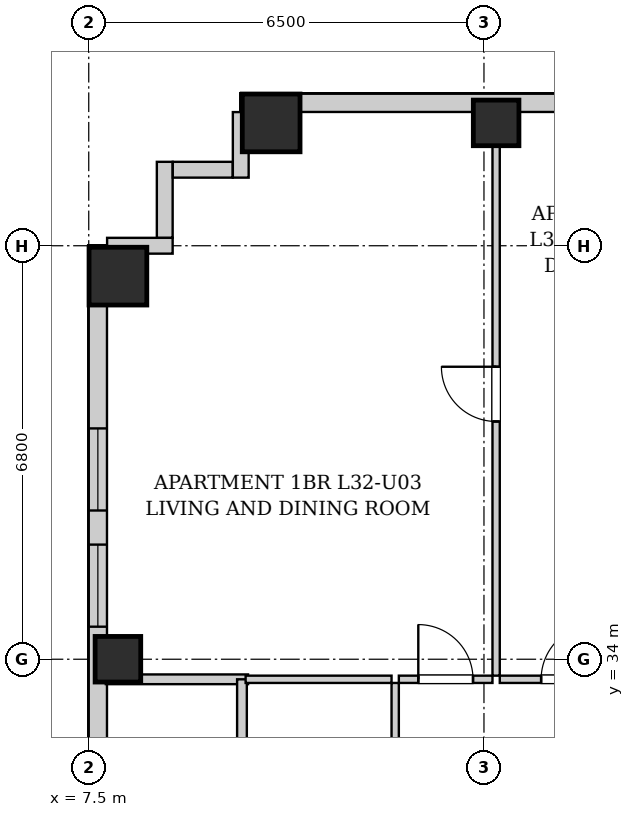
"""IFC4 building model, lengths in metres.
Left out: names, types, materials, properties, quantities, classifications, styles, units other than length and angle.
Written with IfcOpenShell. Run it as: python <this file> out.ifc"""

import sys

from ifc_helpers import new_model, si_unit, direction, frame, frame_2d, origin, origin_2d, place, context, subcontext, project, spatial, rectangle, extrude, element, fill, save


model = new_model("IFC4")
c1 = context("Model", 3, precision=1e-05, world=origin(), true_north=direction((0.0, 1.0)))
c2 = subcontext(c1, "Body", "Model", "MODEL_VIEW")
j1 = project(units=[si_unit("LENGTHUNIT", "METRE"), si_unit("PLANEANGLEUNIT", "RADIAN")], contexts=[c1])
p1 = place(None, origin())
s1 = spatial("IfcSite", under=j1, at=p1, CompositionType="ELEMENT")
p2 = place(p1, origin())
s2 = spatial("IfcBuilding", under=s1, at=p2, CompositionType="ELEMENT")
p3 = place(p2, frame((0.0, 0.0, 113.5)))
s3 = spatial("IfcBuildingStorey", under=s2, at=p3, CompositionType="ELEMENT", Elevation=113.5)
p4 = place(p3, frame((10.5, 42.82, 0.0), z_axis=(0.0, 0.0, 1.0), x_axis=(1.0, 0.0, 0.0)))
e1 = element("IfcColumn", 1, at=p4, inside=s3, PredefinedType="COLUMN", context=c2, shape_type="SweptSolid", body=[
    extrude(rectangle(XDim=0.95, YDim=0.95, at=origin_2d()), origin(), (0.0, 0.0, 1.0), 3.2),
])
for number, where, z_axis, x_axis in (
    (2, (14.2, 42.82, 0.0), (0.0, 0.0, 1.0), (1.0, 0.0, 0.0)),
    (3, (7.98, 34.0, 0.0), (0.0, 0.0, 1.0), (1.0, 0.0, 0.0)),
):
    element("IfcColumn", number, at=place(p3, frame(where, z_axis=z_axis, x_axis=x_axis)), inside=s3, PredefinedType="COLUMN", context=c2, shape_type="SweptSolid", body=[
        extrude(rectangle(XDim=0.75, YDim=0.75, at=origin_2d()), origin(), (0.0, 0.0, 1.0), 3.2),
    ])
p5 = place(p3, frame((7.98, 40.3, 0.0), z_axis=(0.0, 0.0, 1.0), x_axis=(1.0, 0.0, 0.0)))
e4 = element("IfcColumn", 4, at=p5, inside=s3, PredefinedType="COLUMN", context=c2, shape_type="SweptSolid", body=[
    extrude(rectangle(XDim=0.95, YDim=0.95, at=origin_2d()), origin(), (0.0, 0.0, 1.0), 3.2),
])
p6 = place(p3, frame((10.0, 43.15, 0.0), z_axis=(0.0, 0.0, 1.0), x_axis=(1.0, 0.0, 0.0)))
e5 = element("IfcWall", 5, at=p6, inside=s3, PredefinedType="SOLIDWALL", context=c2, shape_type="SweptSolid", body=[
    extrude(rectangle(XDim=21.95, YDim=0.3, at=frame_2d((10.975, 0.0))), origin(), (0.0, 0.0, 1.0), 2.94),
])
p7 = place(p6, frame((5.489, 0.0, 0.55)))
e6 = element("IfcOpeningElement", 6, at=p7, cuts=e5, PredefinedType="OPENING", context=c2, shape_type="SweptSolid", body=[
    extrude(rectangle(XDim=1.35, YDim=1.2, at=frame_2d((0.675, 0.6))), frame((0.0, 0.16, 0.0), z_axis=(0.0, -1.0, 0.0), x_axis=(1.0, 0.0, 0.0)), (0.0, 0.0, 1.0), 0.32),
])
p8 = place(p6, frame((9.322, 0.0, 0.55)))
e7 = element("IfcOpeningElement", 7, at=p8, cuts=e5, PredefinedType="OPENING", context=c2, shape_type="SweptSolid", body=[
    extrude(rectangle(XDim=1.35, YDim=1.2, at=frame_2d((0.675, 0.6))), frame((0.0, 0.16, 0.0), z_axis=(0.0, -1.0, 0.0), x_axis=(1.0, 0.0, 0.0)), (0.0, 0.0, 1.0), 0.32),
])
p9 = place(p6, frame((18.869, 0.0, 0.55)))
e8 = element("IfcOpeningElement", 8, at=p9, cuts=e5, PredefinedType="OPENING", context=c2, shape_type="SweptSolid", body=[
    extrude(rectangle(XDim=1.35, YDim=1.2, at=frame_2d((0.675, 0.6))), frame((0.0, 0.16, 0.0), z_axis=(0.0, -1.0, 0.0), x_axis=(1.0, 0.0, 0.0)), (0.0, 0.0, 1.0), 0.32),
])
p10 = place(p3, frame((7.65, 2.5, 0.0), z_axis=(0.0, 0.0, 1.0), x_axis=(0.0, 1.0, 0.0)))
e9 = element("IfcWall", 9, at=p10, inside=s3, PredefinedType="SOLIDWALL", context=c2, shape_type="SweptSolid", body=[
    extrude(rectangle(XDim=38.3, YDim=0.3, at=frame_2d((19.15, 0.0))), origin(), (0.0, 0.0, 1.0), 2.94),
])
p11 = place(p10, frame((3.38, 0.0, 0.55)))
e10 = element("IfcOpeningElement", 10, at=p11, cuts=e9, PredefinedType="OPENING", context=c2, shape_type="SweptSolid", body=[
    extrude(rectangle(XDim=1.35, YDim=1.2, at=frame_2d((0.675, 0.6))), frame((0.0, 0.16, 0.0), z_axis=(0.0, -1.0, 0.0), x_axis=(1.0, 0.0, 0.0)), (0.0, 0.0, 1.0), 0.32),
])
p12 = place(p10, frame((1.135, 0.0, 0.55)))
e11 = element("IfcOpeningElement", 11, at=p12, cuts=e9, PredefinedType="OPENING", context=c2, shape_type="SweptSolid", body=[
    extrude(rectangle(XDim=1.35, YDim=1.2, at=frame_2d((0.675, 0.6))), frame((0.0, 0.16, 0.0), z_axis=(0.0, -1.0, 0.0), x_axis=(1.0, 0.0, 0.0)), (0.0, 0.0, 1.0), 0.32),
])
p13 = place(p10, frame((33.946, 0.0, 0.55)))
e12 = element("IfcOpeningElement", 12, at=p13, cuts=e9, PredefinedType="OPENING", context=c2, shape_type="SweptSolid", body=[
    extrude(rectangle(XDim=1.35, YDim=1.2, at=frame_2d((0.675, 0.6))), frame((0.0, 0.16, 0.0), z_axis=(0.0, -1.0, 0.0), x_axis=(1.0, 0.0, 0.0)), (0.0, 0.0, 1.0), 0.32),
])
p14 = place(p10, frame((32.035, 0.0, 0.55)))
e13 = element("IfcOpeningElement", 13, at=p14, cuts=e9, PredefinedType="OPENING", context=c2, shape_type="SweptSolid", body=[
    extrude(rectangle(XDim=1.35, YDim=1.2, at=frame_2d((0.675, 0.6))), frame((0.0, 0.16, 0.0), z_axis=(0.0, -1.0, 0.0), x_axis=(1.0, 0.0, 0.0)), (0.0, 0.0, 1.0), 0.32),
])
p15 = place(p10, frame((15.65, 0.0, 0.55)))
e14 = element("IfcOpeningElement", 14, at=p15, cuts=e9, PredefinedType="OPENING", context=c2, shape_type="SweptSolid", body=[
    extrude(rectangle(XDim=1.35, YDim=1.2, at=frame_2d((0.675, 0.6))), frame((0.0, 0.16, 0.0), z_axis=(0.0, -1.0, 0.0), x_axis=(1.0, 0.0, 0.0)), (0.0, 0.0, 1.0), 0.32),
])
p16 = place(p10, frame((13.035, 0.0, 0.55)))
e15 = element("IfcOpeningElement", 15, at=p16, cuts=e9, PredefinedType="OPENING", context=c2, shape_type="SweptSolid", body=[
    extrude(rectangle(XDim=1.35, YDim=1.2, at=frame_2d((0.675, 0.6))), frame((0.0, 0.16, 0.0), z_axis=(0.0, -1.0, 0.0), x_axis=(1.0, 0.0, 0.0)), (0.0, 0.0, 1.0), 0.32),
])
p17 = place(p10, frame((22.831, 0.0, 0.55)))
e16 = element("IfcOpeningElement", 16, at=p17, cuts=e9, PredefinedType="OPENING", context=c2, shape_type="SweptSolid", body=[
    extrude(rectangle(XDim=1.35, YDim=1.2, at=frame_2d((0.675, 0.6))), frame((0.0, 0.16, 0.0), z_axis=(0.0, -1.0, 0.0), x_axis=(1.0, 0.0, 0.0)), (0.0, 0.0, 1.0), 0.32),
])
p18 = place(p10, frame((24.441, 0.0, 0.55)))
e17 = element("IfcOpeningElement", 17, at=p18, cuts=e9, PredefinedType="OPENING", context=c2, shape_type="SweptSolid", body=[
    extrude(rectangle(XDim=1.35, YDim=1.2, at=frame_2d((0.675, 0.6))), frame((0.0, 0.16, 0.0), z_axis=(0.0, -1.0, 0.0), x_axis=(1.0, 0.0, 0.0)), (0.0, 0.0, 1.0), 0.32),
])
p19 = place(p3, frame((7.802, 40.8, 0.0), z_axis=(0.0, 0.0, 1.0), x_axis=(1.0, 0.0, 0.0)))
e18 = element("IfcWall", 18, at=p19, inside=s3, PredefinedType="SOLIDWALL", context=c2, shape_type="SweptSolid", body=[
    extrude(rectangle(XDim=1.078, YDim=0.26, at=frame_2d((0.539, 0.0))), origin(), (0.0, 0.0, 1.0), 2.94),
])
p20 = place(p3, frame((8.75, 40.932, 0.0), z_axis=(0.0, 0.0, 1.0), x_axis=(0.0, 1.0, 0.0)))
e19 = element("IfcWall", 19, at=p20, inside=s3, PredefinedType="SOLIDWALL", context=c2, shape_type="SweptSolid", body=[
    extrude(rectangle(XDim=1.248, YDim=0.26, at=frame_2d((0.624, 0.0))), origin(), (0.0, 0.0, 1.0), 2.94),
])
p21 = place(p3, frame((8.882, 42.05, 0.0), z_axis=(0.0, 0.0, 1.0), x_axis=(1.0, 0.0, 0.0)))
e20 = element("IfcWall", 20, at=p21, inside=s3, PredefinedType="SOLIDWALL", context=c2, shape_type="SweptSolid", body=[
    extrude(rectangle(XDim=0.986, YDim=0.26, at=frame_2d((0.493, 0.0))), origin(), (0.0, 0.0, 1.0), 2.94),
])
p22 = place(p3, frame((10.0, 41.92, 0.0), z_axis=(0.0, 0.0, 1.0), x_axis=(0.0, 1.0, 0.0)))
e21 = element("IfcWall", 21, at=p22, inside=s3, PredefinedType="SOLIDWALL", context=c2, shape_type="SweptSolid", body=[
    extrude(rectangle(XDim=1.078, YDim=0.26, at=frame_2d((0.539, 0.0))), origin(), (0.0, 0.0, 1.0), 2.94),
])
p23 = place(p3, frame((7.78, 33.67, 0.0), z_axis=(0.0, 0.0, 1.0), x_axis=(1.0, 0.0, 0.0)))
e22 = element("IfcWall", 22, at=p23, inside=s3, PredefinedType="PARTITIONING", context=c2, shape_type="SweptSolid", body=[
    extrude(rectangle(XDim=2.34, YDim=0.16, at=frame_2d((1.17, 0.0))), origin(), (0.0, 0.0, 1.0), 2.94),
])
p24 = place(p3, frame((10.02, 30.76, 0.0), z_axis=(0.0, 0.0, 1.0), x_axis=(0.0, 1.0, 0.0)))
e23 = element("IfcWall", 23, at=p24, inside=s3, PredefinedType="PARTITIONING", context=c2, shape_type="SweptSolid", body=[
    extrude(rectangle(XDim=2.91, YDim=0.16, at=frame_2d((1.455, 0.0))), origin(), (0.0, 0.0, 1.0), 2.94),
])
p25 = place(p3, frame((12.54, 30.76, 0.0), z_axis=(0.0, 0.0, 1.0), x_axis=(0.0, 1.0, 0.0)))
e24 = element("IfcWall", 24, at=p25, inside=s3, PredefinedType="PARTITIONING", context=c2, shape_type="SweptSolid", body=[
    extrude(rectangle(XDim=2.85, YDim=0.12, at=frame_2d((1.425, 0.0))), origin(), (0.0, 0.0, 1.0), 2.94),
])
p26 = place(p25, frame((0.995, 0.0, 0.0)))
e25 = element("IfcOpeningElement", 25, at=p26, cuts=e24, PredefinedType="OPENING", context=c2, shape_type="SweptSolid", body=[
    extrude(rectangle(XDim=0.86, YDim=2.05, at=frame_2d((0.43, 1.025))), frame((0.0, 0.07, 0.0), z_axis=(0.0, -1.0, 0.0), x_axis=(1.0, 0.0, 0.0)), (0.0, 0.0, 1.0), 0.14),
])
p27 = place(p3, frame((10.08, 33.67, 0.0), z_axis=(0.0, 0.0, 1.0), x_axis=(1.0, 0.0, 0.0)))
e26 = element("IfcWall", 26, at=p27, inside=s3, PredefinedType="PARTITIONING", context=c2, shape_type="SweptSolid", body=[
    extrude(rectangle(XDim=2.4, YDim=0.12, at=frame_2d((1.2, 0.0))), origin(), (0.0, 0.0, 1.0), 2.94),
])
p28 = place(p3, frame((12.6, 33.67, 0.0), z_axis=(0.0, 0.0, 1.0), x_axis=(1.0, 0.0, 0.0)))
e27 = element("IfcWall", 27, at=p28, inside=s3, PredefinedType="PARTITIONING", context=c2, shape_type="SweptSolid", body=[
    extrude(rectangle(XDim=1.54, YDim=0.12, at=frame_2d((0.77, 0.0))), origin(), (0.0, 0.0, 1.0), 2.94),
])
p29 = place(p28, frame((0.32, 0.0, 0.0)))
e28 = element("IfcOpeningElement", 28, at=p29, cuts=e27, PredefinedType="OPENING", context=c2, shape_type="SweptSolid", body=[
    extrude(rectangle(XDim=0.9, YDim=2.05, at=frame_2d((0.45, 1.025))), frame((0.0, 0.07, 0.0), z_axis=(0.0, -1.0, 0.0), x_axis=(1.0, 0.0, 0.0)), (0.0, 0.0, 1.0), 0.14),
])
p30 = place(p3, frame((14.26, 33.67, 0.0), z_axis=(0.0, 0.0, 1.0), x_axis=(1.0, 0.0, 0.0)))
e29 = element("IfcWall", 29, at=p30, inside=s3, PredefinedType="PARTITIONING", context=c2, shape_type="SweptSolid", body=[
    extrude(rectangle(XDim=2.26, YDim=0.12, at=frame_2d((1.13, 0.0))), origin(), (0.0, 0.0, 1.0), 2.94),
])
p31 = place(p30, frame((0.68, 0.0, 0.0)))
e30 = element("IfcOpeningElement", 30, at=p31, cuts=e29, PredefinedType="OPENING", context=c2, shape_type="SweptSolid", body=[
    extrude(rectangle(XDim=0.9, YDim=2.05, at=frame_2d((0.45, 1.025))), frame((0.0, 0.07, 0.0), z_axis=(0.0, -1.0, 0.0), x_axis=(1.0, 0.0, 0.0)), (0.0, 0.0, 1.0), 0.14),
])
p32 = place(p3, frame((14.2, 33.73, 0.0), z_axis=(0.0, 0.0, 1.0), x_axis=(0.0, 1.0, 0.0)))
e31 = element("IfcWall", 31, at=p32, inside=s3, PredefinedType="PARTITIONING", context=c2, shape_type="SweptSolid", body=[
    extrude(rectangle(XDim=9.29, YDim=0.12, at=frame_2d((4.645, 0.0))), origin(), (0.0, 0.0, 1.0), 2.94),
])
p33 = place(p32, frame((4.18, 0.0, 0.0)))
e32 = element("IfcOpeningElement", 32, at=p33, cuts=e31, PredefinedType="OPENING", context=c2, shape_type="SweptSolid", body=[
    extrude(rectangle(XDim=0.9, YDim=2.05, at=frame_2d((0.45, 1.025))), frame((0.0, 0.07, 0.0), z_axis=(0.0, -1.0, 0.0), x_axis=(1.0, 0.0, 0.0)), (0.0, 0.0, 1.0), 0.14),
])
p34 = place(p29, origin())
e33 = element("IfcDoor", 33, at=p34, inside=s3, OperationType="SINGLE_SWING_LEFT", PredefinedType="DOOR", context=c2, shape_type="SweptSolid", body=[
    extrude(rectangle(XDim=0.9, YDim=2.05, at=frame_2d((0.45, 1.025))), frame((0.0, 0.025, 0.0), z_axis=(0.0, -1.0, 0.0), x_axis=(1.0, 0.0, 0.0)), (0.0, 0.0, 1.0), 0.05),
])
fill(e28, e33)
p35 = place(p31, origin())
e34 = element("IfcDoor", 34, at=p35, inside=s3, OperationType="SINGLE_SWING_RIGHT", PredefinedType="DOOR", context=c2, shape_type="SweptSolid", body=[
    extrude(rectangle(XDim=0.9, YDim=2.05, at=frame_2d((0.45, 1.025))), frame((0.0, 0.025, 0.0), z_axis=(0.0, -1.0, 0.0), x_axis=(1.0, 0.0, 0.0)), (0.0, 0.0, 1.0), 0.05),
])
fill(e30, e34)
p36 = place(p33, origin())
e35 = element("IfcDoor", 35, at=p36, inside=s3, OperationType="SINGLE_SWING_RIGHT", PredefinedType="DOOR", context=c2, shape_type="SweptSolid", body=[
    extrude(rectangle(XDim=0.9, YDim=2.05, at=frame_2d((0.45, 1.025))), frame((0.0, 0.025, 0.0), z_axis=(0.0, -1.0, 0.0), x_axis=(1.0, 0.0, 0.0)), (0.0, 0.0, 1.0), 0.05),
])
fill(e32, e35)
p37 = place(p13, origin())
e36 = element("IfcWindow", 36, at=p37, inside=s3, PartitioningType="SINGLE_PANEL", PredefinedType="WINDOW", context=c2, shape_type="SweptSolid", body=[
    extrude(rectangle(XDim=1.35, YDim=1.2, at=frame_2d((0.675, 0.6))), frame((0.0, 0.03, 0.0), z_axis=(0.0, -1.0, 0.0), x_axis=(1.0, 0.0, 0.0)), (0.0, 0.0, 1.0), 0.06),
])
fill(e12, e36)
p38 = place(p14, origin())
e37 = element("IfcWindow", 37, at=p38, inside=s3, PartitioningType="SINGLE_PANEL", PredefinedType="WINDOW", context=c2, shape_type="SweptSolid", body=[
    extrude(rectangle(XDim=1.35, YDim=1.2, at=frame_2d((0.675, 0.6))), frame((0.0, 0.03, 0.0), z_axis=(0.0, -1.0, 0.0), x_axis=(1.0, 0.0, 0.0)), (0.0, 0.0, 1.0), 0.06),
])
fill(e13, e37)
save(model, sys.argv[1])
